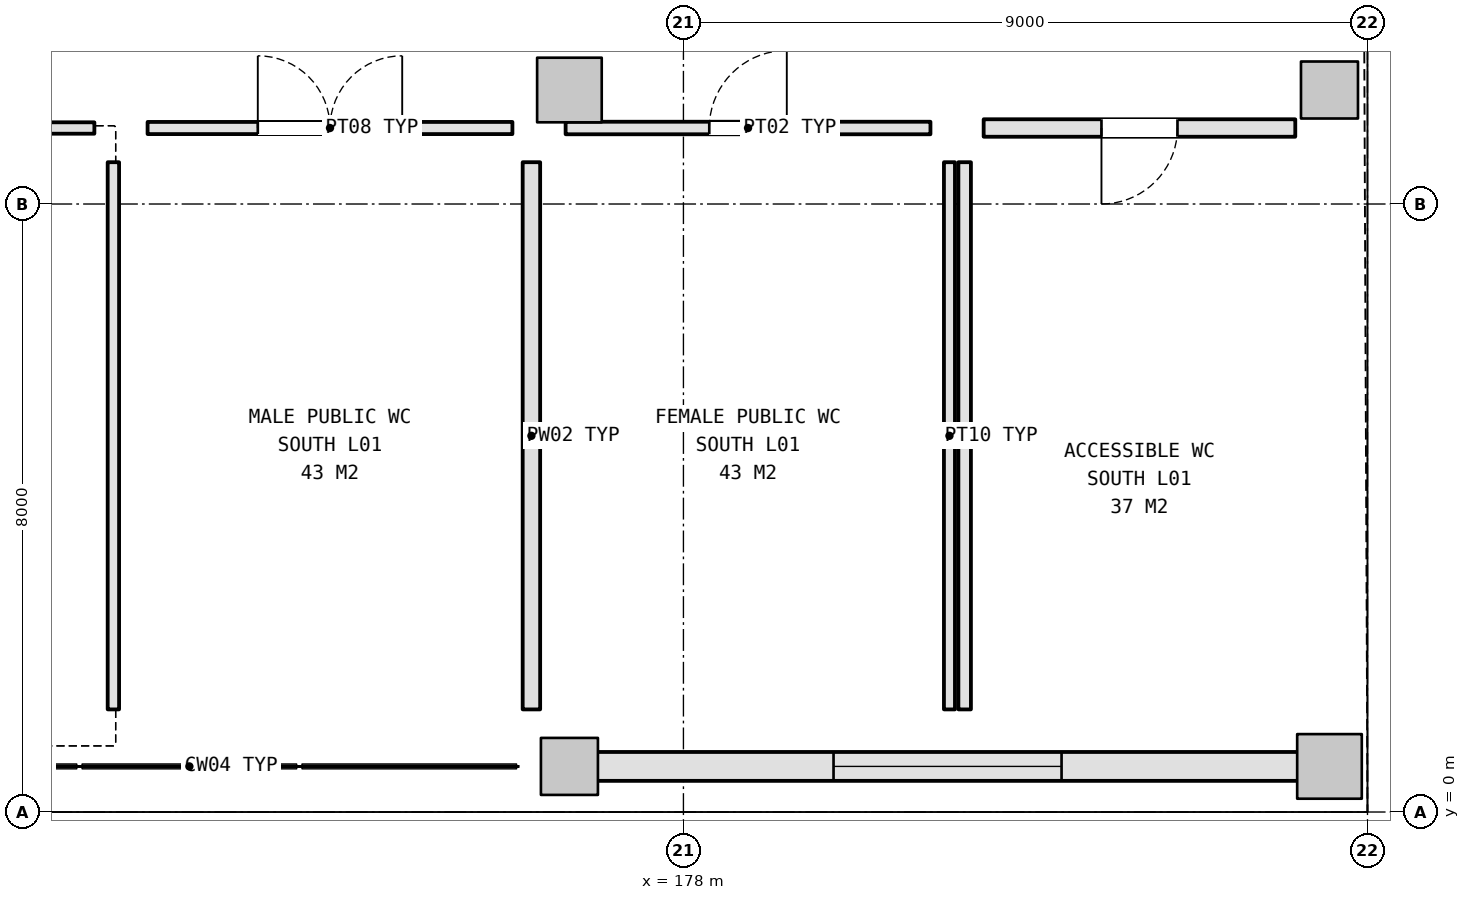
"""IFC4 building model, lengths in metres.
Left out: names, types, materials, properties, quantities, classifications, styles, units other than length and angle.
Written with IfcOpenShell. Run it as: python <this file> out.ifc"""

import sys

from ifc_helpers import new_model, si_unit, direction, frame, frame_2d, origin, origin_2d, place, context, subcontext, project, spatial, rectangle, extrude, element, fill, save


model = new_model("IFC4")
c1 = context("Model", 3, precision=1e-05, world=origin(), true_north=direction((0.0, 1.0)))
c2 = subcontext(c1, "Body", "Model", "MODEL_VIEW")
j1 = project(units=[si_unit("LENGTHUNIT", "METRE"), si_unit("PLANEANGLEUNIT", "RADIAN")], contexts=[c1])
p1 = place(None, origin())
s1 = spatial("IfcSite", under=j1, at=p1, CompositionType="ELEMENT")
p2 = place(p1, origin())
s2 = spatial("IfcBuilding", under=s1, at=p2, CompositionType="ELEMENT")
p3 = place(p2, frame((0.0, 0.0, 5.4)))
s3 = spatial("IfcBuildingStorey", under=s2, at=p3, CompositionType="ELEMENT", Elevation=5.4)
p4 = place(p3, frame((176.5, 0.6, 0.0), z_axis=(0.0, 0.0, 1.0), x_axis=(1.0, 0.0, 0.0)))
e1 = element("IfcColumn", 1, at=p4, inside=s3, PredefinedType="COLUMN", context=c2, shape_type="SweptSolid", body=[
    extrude(rectangle(XDim=0.75, YDim=0.75, at=origin_2d()), origin(), (0.0, 0.0, 1.0), 5.4),
])
for number, where, z_axis, x_axis in (
    (2, (176.5, 9.5, 0.0), (0.0, 0.0, 1.0), (1.0, 0.0, 0.0)),
    (3, (186.5, 0.6, 0.0), (0.0, 0.0, 1.0), (1.0, 0.0, 0.0)),
):
    element("IfcColumn", number, at=place(p3, frame(where, z_axis=z_axis, x_axis=x_axis)), inside=s3, PredefinedType="COLUMN", context=c2, shape_type="SweptSolid", body=[
        extrude(rectangle(XDim=0.85, YDim=0.85, at=origin_2d()), origin(), (0.0, 0.0, 1.0), 5.4),
    ])
p5 = place(p3, frame((186.5, 9.5, 0.0), z_axis=(0.0, 0.0, 1.0), x_axis=(1.0, 0.0, 0.0)))
e4 = element("IfcColumn", 4, at=p5, inside=s3, PredefinedType="COLUMN", context=c2, shape_type="SweptSolid", body=[
    extrude(rectangle(XDim=0.75, YDim=0.75, at=origin_2d()), origin(), (0.0, 0.0, 1.0), 5.4),
])
p6 = place(p3, frame((176.863, 0.6, 0.0), z_axis=(0.0, 0.0, 1.0), x_axis=(1.0, 0.0, 0.0)))
e5 = element("IfcWall", 5, at=p6, inside=s3, PredefinedType="SOLIDWALL", context=c2, shape_type="SweptSolid", body=[
    extrude(rectangle(XDim=9.224, YDim=0.38, at=frame_2d((4.612, 0.0))), origin(), (0.0, 0.0, 1.0), 4.425),
])
p7 = place(p6, frame((3.112, 0.0, 1.05)))
e6 = element("IfcOpeningElement", 6, at=p7, cuts=e5, PredefinedType="OPENING", context=c2, shape_type="SweptSolid", body=[
    extrude(rectangle(XDim=3.0, YDim=2.4, at=frame_2d((1.5, 1.2))), frame((0.0, 0.2, 0.0), z_axis=(0.0, -1.0, 0.0), x_axis=(1.0, 0.0, 0.0)), (0.0, 0.0, 1.0), 0.4),
])
p8 = place(p3, frame((152.95, 9.0, 0.0), z_axis=(0.0, 0.0, 1.0), x_axis=(1.0, 0.0, 0.0)))
e7 = element("IfcWall", 7, at=p8, inside=s3, PredefinedType="PARTITIONING", context=c2, shape_type="SweptSolid", body=[
    extrude(rectangle(XDim=17.3, YDim=0.15, at=frame_2d((8.65, 0.0))), origin(), (0.0, 0.0, 1.0), 4.425),
])
p9 = place(p8, frame((8.15, 0.0, 0.0)))
e8 = element("IfcOpeningElement", 8, at=p9, cuts=e7, PredefinedType="OPENING", context=c2, shape_type="SweptSolid", body=[
    extrude(rectangle(XDim=1.0, YDim=2.1, at=frame_2d((0.5, 1.05))), frame((0.0, 0.085, 0.0), z_axis=(0.0, -1.0, 0.0), x_axis=(1.0, 0.0, 0.0)), (0.0, 0.0, 1.0), 0.17),
])
p10 = place(p3, frame((170.5, 8.55, 0.0), z_axis=(0.0, 0.0, 1.0), x_axis=(0.0, -1.0, 0.0)))
e9 = element("IfcWall", 9, at=p10, inside=s3, PredefinedType="PARTITIONING", context=c2, shape_type="SweptSolid", body=[
    extrude(rectangle(XDim=7.2, YDim=0.15, at=frame_2d((3.6, 0.0))), origin(), (0.0, 0.0, 1.0), 4.625),
])
p11 = place(p3, frame((170.95, 9.0, 0.0), z_axis=(0.0, 0.0, 1.0), x_axis=(1.0, 0.0, 0.0)))
e10 = element("IfcWall", 10, at=p11, inside=s3, PredefinedType="PARTITIONING", context=c2, shape_type="SweptSolid", body=[
    extrude(rectangle(XDim=4.8, YDim=0.16, at=frame_2d((2.4, 0.0))), origin(), (0.0, 0.0, 1.0), 5.12),
])
p12 = place(p11, frame((1.45, 0.0, 0.0)))
e11 = element("IfcOpeningElement", 11, at=p12, cuts=e10, PredefinedType="OPENING", context=c2, shape_type="SweptSolid", body=[
    extrude(rectangle(XDim=1.9, YDim=2.3, at=frame_2d((0.95, 1.15))), frame((0.0, 0.09, 0.0), z_axis=(0.0, -1.0, 0.0), x_axis=(1.0, 0.0, 0.0)), (0.0, 0.0, 1.0), 0.18),
])
p13 = place(p3, frame((176.0, 8.55, 0.0), z_axis=(0.0, 0.0, 1.0), x_axis=(0.0, -1.0, 0.0)))
e12 = element("IfcWall", 12, at=p13, inside=s3, PredefinedType="PLUMBINGWALL", context=c2, shape_type="SweptSolid", body=[
    extrude(rectangle(XDim=7.2, YDim=0.23, at=frame_2d((3.6, 0.0))), origin(), (0.0, 0.0, 1.0), 4.625),
])
p14 = place(p3, frame((176.45, 9.0, 0.0), z_axis=(0.0, 0.0, 1.0), x_axis=(1.0, 0.0, 0.0)))
e13 = element("IfcWall", 13, at=p14, inside=s3, PredefinedType="PARTITIONING", context=c2, shape_type="SweptSolid", body=[
    extrude(rectangle(XDim=4.8, YDim=0.165, at=frame_2d((2.4, 0.0))), origin(), (0.0, 0.0, 1.0), 4.425),
])
p15 = place(p14, frame((1.89, 0.0, 0.0)))
e14 = element("IfcOpeningElement", 14, at=p15, cuts=e13, PredefinedType="OPENING", context=c2, shape_type="SweptSolid", body=[
    extrude(rectangle(XDim=1.02, YDim=2.15, at=frame_2d((0.51, 1.075))), frame((0.0, 0.093, 0.0), z_axis=(0.0, -1.0, 0.0), x_axis=(1.0, 0.0, 0.0)), (0.0, 0.0, 1.0), 0.185),
])
p16 = place(p3, frame((181.5, 8.55, 0.0), z_axis=(0.0, 0.0, 1.0), x_axis=(0.0, -1.0, 0.0)))
e15 = element("IfcWall", 15, at=p16, inside=s3, PredefinedType="PARTITIONING", context=c2, shape_type="SweptSolid", body=[
    extrude(rectangle(XDim=7.2, YDim=0.145, at=frame_2d((3.6, 0.0))), origin(), (0.0, 0.0, 1.0), 4.625),
])
p17 = place(p3, frame((181.95, 9.0, 0.0), z_axis=(0.0, 0.0, 1.0), x_axis=(1.0, 0.0, 0.0)))
e16 = element("IfcWall", 16, at=p17, inside=s3, PredefinedType="PLUMBINGWALL", context=c2, shape_type="SweptSolid", body=[
    extrude(rectangle(XDim=4.1, YDim=0.23, at=frame_2d((2.05, 0.0))), origin(), (0.0, 0.0, 1.0), 5.12),
])
p18 = place(p17, frame((1.55, 0.0, 0.0)))
e17 = element("IfcOpeningElement", 17, at=p18, cuts=e16, PredefinedType="OPENING", context=c2, shape_type="SweptSolid", body=[
    extrude(rectangle(XDim=1.0, YDim=2.15, at=frame_2d((0.5, 1.075))), frame((0.0, 0.125, 0.0), z_axis=(0.0, -1.0, 0.0), x_axis=(1.0, 0.0, 0.0)), (0.0, 0.0, 1.0), 0.25),
])
p19 = place(p3, frame((181.7, 1.35, 0.0), z_axis=(0.0, 0.0, 1.0), x_axis=(0.0, 1.0, 0.0)))
e18 = element("IfcWall", 18, at=p19, inside=s3, PredefinedType="PARTITIONING", context=c2, shape_type="SweptSolid", body=[
    extrude(rectangle(XDim=7.2, YDim=0.165, at=frame_2d((3.6, 0.0))), origin(), (0.0, 0.0, 1.0), 4.625),
])
p20 = place(p7, origin())
e19 = element("IfcWindow", 19, at=p20, inside=s3, PartitioningType="SINGLE_PANEL", PredefinedType="WINDOW", context=c2, shape_type="SweptSolid", body=[
    extrude(rectangle(XDim=3.0, YDim=2.4, at=frame_2d((1.5, 1.2))), frame((0.0, 0.03, 0.0), z_axis=(0.0, -1.0, 0.0), x_axis=(1.0, 0.0, 0.0)), (0.0, 0.0, 1.0), 0.06),
])
fill(e6, e19)
p21 = place(p12, origin())
e20 = element("IfcDoor", 20, at=p21, inside=s3, OperationType="DOUBLE_DOOR_SINGLE_SWING", PredefinedType="DOOR", context=c2, shape_type="SweptSolid", body=[
    extrude(rectangle(XDim=1.9, YDim=2.3, at=frame_2d((0.95, 1.15))), frame((0.0, 0.025, 0.0), z_axis=(0.0, -1.0, 0.0), x_axis=(1.0, 0.0, 0.0)), (0.0, 0.0, 1.0), 0.05),
])
fill(e11, e20)
p22 = place(p15, origin())
e21 = element("IfcDoor", 21, at=p22, inside=s3, OperationType="SINGLE_SWING_RIGHT", PredefinedType="DOOR", context=c2, shape_type="SweptSolid", body=[
    extrude(rectangle(XDim=1.02, YDim=2.15, at=frame_2d((0.51, 1.075))), frame((0.0, 0.025, 0.0), z_axis=(0.0, -1.0, 0.0), x_axis=(1.0, 0.0, 0.0)), (0.0, 0.0, 1.0), 0.05),
])
fill(e14, e21)
p23 = place(p18, frame((1.0, 0.0, 0.0), z_axis=(0.0, 0.0, 1.0), x_axis=(-1.0, 0.0, 0.0)))
e22 = element("IfcDoor", 22, at=p23, inside=s3, OperationType="SINGLE_SWING_LEFT", PredefinedType="DOOR", context=c2, shape_type="SweptSolid", body=[
    extrude(rectangle(XDim=1.0, YDim=2.15, at=frame_2d((0.5, 1.075))), frame((0.0, 0.025, 0.0), z_axis=(0.0, -1.0, 0.0), x_axis=(1.0, 0.0, 0.0)), (0.0, 0.0, 1.0), 0.05),
])
fill(e17, e22)
save(model, sys.argv[1])
